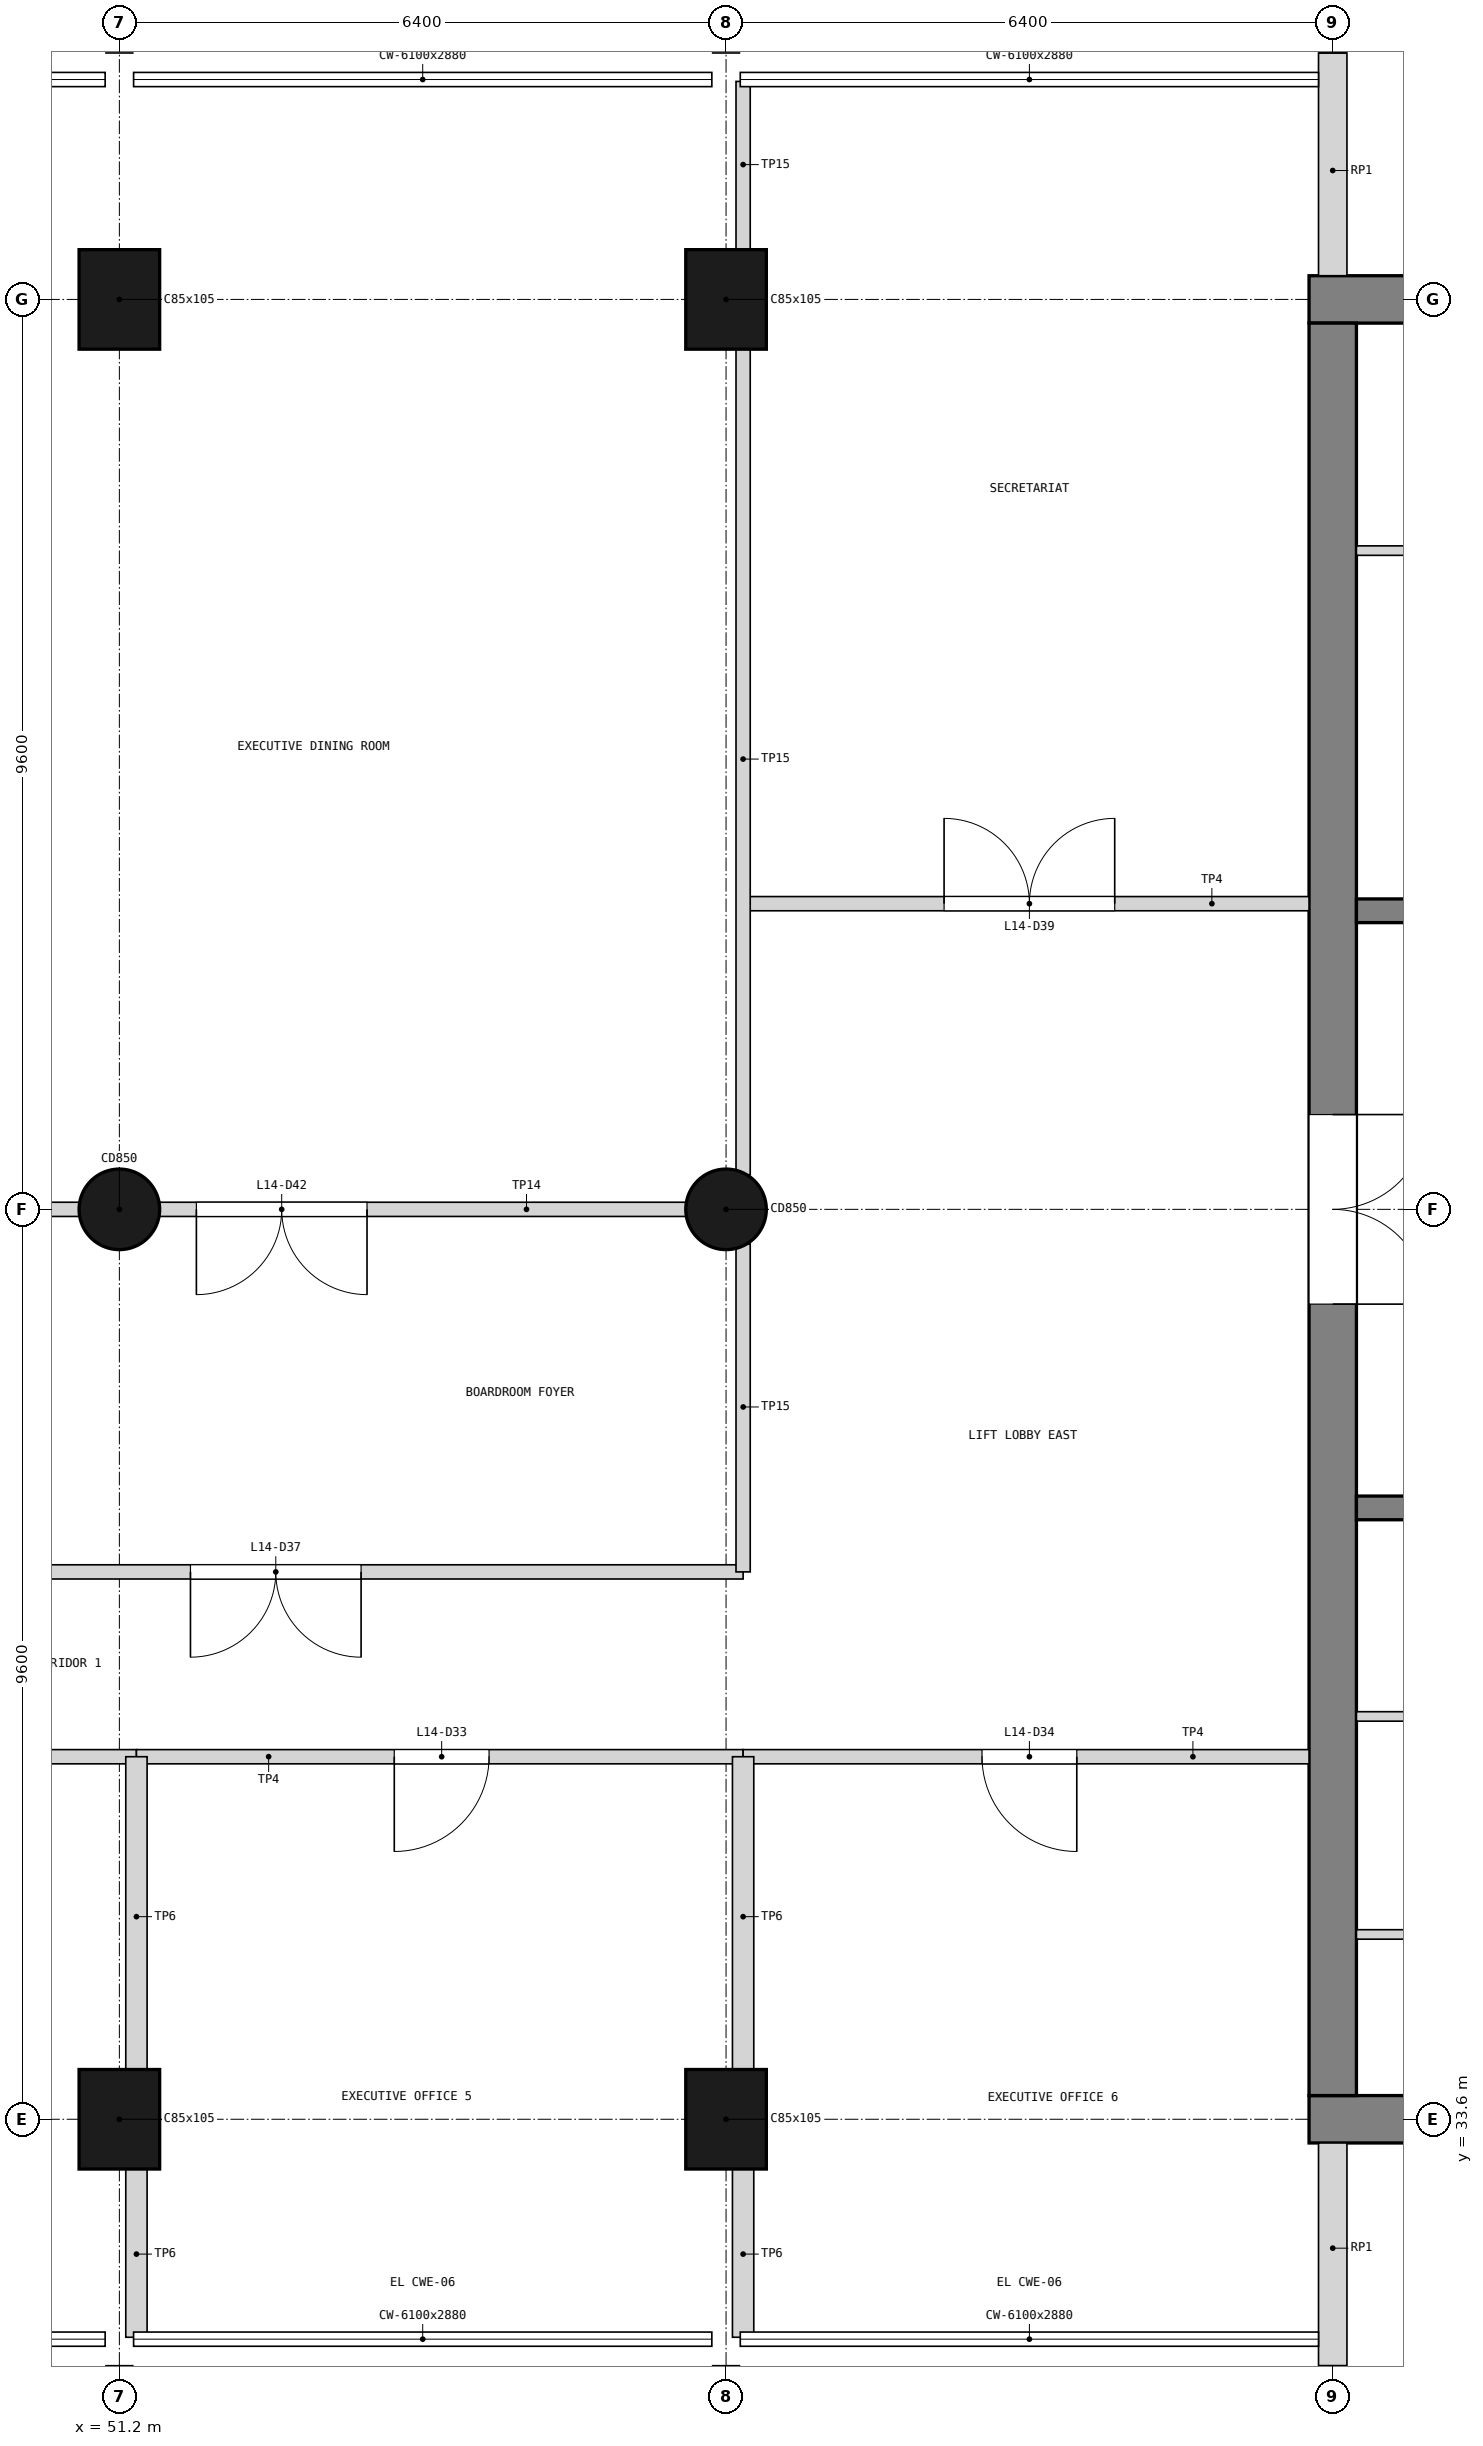
"""IFC4 building model, lengths in metres.
Left out: names, types, materials, properties, quantities, classifications, styles, units other than length and angle.
Written with IfcOpenShell. Run it as: python <this file> out.ifc"""

import sys

from ifc_helpers import new_model, si_unit, direction, frame, frame_2d, origin, origin_2d, place, context, subcontext, project, spatial, rectangle, circle, extrude, element, fill, save


model = new_model("IFC4")
c1 = context("Model", 3, precision=1e-05, world=origin(), true_north=direction((0.0, 1.0)))
c2 = subcontext(c1, "Body", "Model", "MODEL_VIEW")
j1 = project(units=[si_unit("LENGTHUNIT", "METRE"), si_unit("PLANEANGLEUNIT", "RADIAN")], contexts=[c1])
p1 = place(None, origin())
s1 = spatial("IfcSite", under=j1, at=p1, CompositionType="ELEMENT")
p2 = place(p1, origin())
s2 = spatial("IfcBuilding", under=s1, at=p2, CompositionType="ELEMENT")
p3 = place(p2, frame((0.0, 0.0, 56.1)))
s3 = spatial("IfcBuildingStorey", under=s2, at=p3, CompositionType="ELEMENT", Elevation=56.1)
p4 = place(p3, frame((63.75, 52.8, 0.0), z_axis=(0.0, 0.0, 1.0), x_axis=(1.0, 0.0, 0.0)))
e1 = element("IfcWall", 1, at=p4, inside=s3, PredefinedType="SHEAR", context=c2, shape_type="SweptSolid", body=[
    extrude(rectangle(XDim=13.3, YDim=0.5, at=frame_2d((6.65, 0.0))), origin(), (0.0, 0.0, 1.0), 3.9),
])
p5 = place(p4, frame((11.05, 0.0, 1.0)))
e2 = element("IfcOpeningElement", 2, at=p5, cuts=e1, PredefinedType="OPENING", context=c2, shape_type="SweptSolid", body=[
    extrude(rectangle(XDim=0.4, YDim=2.0, at=frame_2d((0.2, 1.0))), frame((0.0, 0.26, 0.0), z_axis=(0.0, -1.0, 0.0), x_axis=(1.0, 0.0, 0.0)), (0.0, 0.0, 1.0), 0.52),
])
p6 = place(p3, frame((63.75, 33.6, 0.0), z_axis=(0.0, 0.0, 1.0), x_axis=(1.0, 0.0, 0.0)))
e3 = element("IfcWall", 3, at=p6, inside=s3, PredefinedType="SHEAR", context=c2, shape_type="SweptSolid", body=[
    extrude(rectangle(XDim=13.3, YDim=0.5, at=frame_2d((6.65, 0.0))), origin(), (0.0, 0.0, 1.0), 3.9),
])
p7 = place(p6, frame((11.05, 0.0, 1.0)))
e4 = element("IfcOpeningElement", 4, at=p7, cuts=e3, PredefinedType="OPENING", context=c2, shape_type="SweptSolid", body=[
    extrude(rectangle(XDim=0.4, YDim=2.0, at=frame_2d((0.2, 1.0))), frame((0.0, 0.26, 0.0), z_axis=(0.0, -1.0, 0.0), x_axis=(1.0, 0.0, 0.0)), (0.0, 0.0, 1.0), 0.52),
])
p8 = place(p3, frame((64.0, 33.85, 0.0), z_axis=(0.0, 0.0, 1.0), x_axis=(0.0, 1.0, 0.0)))
e5 = element("IfcWall", 5, at=p8, inside=s3, PredefinedType="SHEAR", context=c2, shape_type="SweptSolid", body=[
    extrude(rectangle(XDim=18.7, YDim=0.5, at=frame_2d((9.35, 0.0))), origin(), (0.0, 0.0, 1.0), 3.9),
])
p9 = place(p8, frame((8.35, 0.0, 0.0)))
e6 = element("IfcOpeningElement", 6, at=p9, cuts=e5, PredefinedType="OPENING", context=c2, shape_type="SweptSolid", body=[
    extrude(rectangle(XDim=2.0, YDim=2.1, at=frame_2d((1.0, 1.05))), frame((0.0, 0.26, 0.0), z_axis=(0.0, -1.0, 0.0), x_axis=(1.0, 0.0, 0.0)), (0.0, 0.0, 1.0), 0.52),
])
p10 = place(p3, frame((51.2, 33.6, 0.0), z_axis=(0.0, 0.0, 1.0), x_axis=(1.0, 0.0, 0.0)))
e7 = element("IfcColumn", 7, at=p10, inside=s3, PredefinedType="COLUMN", context=c2, shape_type="SweptSolid", body=[
    extrude(rectangle(XDim=0.85, YDim=1.05, at=origin_2d()), origin(), (0.0, 0.0, 1.0), 3.9),
])
p11 = place(p3, frame((51.2, 43.2, 0.0), z_axis=(0.0, 0.0, 1.0), x_axis=(1.0, 0.0, 0.0)))
e8 = element("IfcColumn", 8, at=p11, inside=s3, PredefinedType="COLUMN", context=c2, shape_type="SweptSolid", body=[
    extrude(circle(Radius=0.425, at=origin_2d()), origin(), (0.0, 0.0, 1.0), 3.9),
])
for number, where, z_axis, x_axis in (
    (9, (51.2, 52.8, 0.0), (0.0, 0.0, 1.0), (1.0, 0.0, 0.0)),
    (10, (57.6, 33.6, 0.0), (0.0, 0.0, 1.0), (1.0, 0.0, 0.0)),
):
    element("IfcColumn", number, at=place(p3, frame(where, z_axis=z_axis, x_axis=x_axis)), inside=s3, PredefinedType="COLUMN", context=c2, shape_type="SweptSolid", body=[
        extrude(rectangle(XDim=0.85, YDim=1.05, at=origin_2d()), origin(), (0.0, 0.0, 1.0), 3.9),
    ])
p12 = place(p3, frame((57.6, 43.2, 0.0), z_axis=(0.0, 0.0, 1.0), x_axis=(1.0, 0.0, 0.0)))
e11 = element("IfcColumn", 11, at=p12, inside=s3, PredefinedType="COLUMN", context=c2, shape_type="SweptSolid", body=[
    extrude(circle(Radius=0.425, at=origin_2d()), origin(), (0.0, 0.0, 1.0), 3.9),
])
p13 = place(p3, frame((57.6, 52.8, 0.0), z_axis=(0.0, 0.0, 1.0), x_axis=(1.0, 0.0, 0.0)))
e12 = element("IfcColumn", 12, at=p13, inside=s3, PredefinedType="COLUMN", context=c2, shape_type="SweptSolid", body=[
    extrude(rectangle(XDim=0.85, YDim=1.05, at=origin_2d()), origin(), (0.0, 0.0, 1.0), 3.9),
])
p14 = place(p3, frame((64.0, 31.0, 0.0), z_axis=(0.0, 0.0, 1.0), x_axis=(0.0, 1.0, 0.0)))
e13 = element("IfcWall", 13, at=p14, inside=s3, PredefinedType="SOLIDWALL", context=c2, shape_type="SweptSolid", body=[
    extrude(rectangle(XDim=2.35, YDim=0.3, at=frame_2d((1.175, 0.0))), origin(), (0.0, 0.0, 1.0), 2.88),
])
p15 = place(p3, frame((64.0, 53.05, 0.0), z_axis=(0.0, 0.0, 1.0), x_axis=(0.0, 1.0, 0.0)))
e14 = element("IfcWall", 14, at=p15, inside=s3, PredefinedType="SOLIDWALL", context=c2, shape_type="SweptSolid", body=[
    extrude(rectangle(XDim=2.35, YDim=0.3, at=frame_2d((1.175, 0.0))), origin(), (0.0, 0.0, 1.0), 2.88),
])
for number, where, z_axis, x_axis in (
    (15, (69.725, 40.05, 0.0), (0.0, 0.0, 1.0), (-1.0, 0.0, 0.0)),
    (16, (69.725, 46.35, 0.0), (0.0, 0.0, 1.0), (-1.0, 0.0, 0.0)),
):
    element("IfcWall", number, at=place(p3, frame(where, z_axis=z_axis, x_axis=x_axis)), inside=s3, PredefinedType="SOLIDWALL", context=c2, shape_type="SweptSolid", body=[
        extrude(rectangle(XDim=5.475, YDim=0.25, at=frame_2d((2.738, 0.0))), origin(), (0.0, 0.0, 1.0), 3.6),
    ])
p16 = place(p3, frame((69.475, 35.55, 0.0), z_axis=(0.0, 0.0, 1.0), x_axis=(-1.0, 0.0, 0.0)))
e17 = element("IfcWall", 17, at=p16, inside=s3, PredefinedType="PARTITIONING", context=c2, shape_type="SweptSolid", body=[
    extrude(rectangle(XDim=5.225, YDim=0.1, at=frame_2d((2.613, 0.0))), origin(), (0.0, 0.0, 1.0), 3.6),
])
p17 = place(p3, frame((67.925, 37.85, 0.0), z_axis=(0.0, 0.0, 1.0), x_axis=(-1.0, 0.0, 0.0)))
e18 = element("IfcWall", 18, at=p17, inside=s3, PredefinedType="PARTITIONING", context=c2, shape_type="SweptSolid", body=[
    extrude(rectangle(XDim=3.675, YDim=0.1, at=frame_2d((1.837, 0.0))), origin(), (0.0, 0.0, 1.0), 3.6),
])
p18 = place(p3, frame((69.475, 50.15, 0.0), z_axis=(0.0, 0.0, 1.0), x_axis=(-1.0, 0.0, 0.0)))
e19 = element("IfcWall", 19, at=p18, inside=s3, PredefinedType="PARTITIONING", context=c2, shape_type="SweptSolid", body=[
    extrude(rectangle(XDim=5.225, YDim=0.1, at=frame_2d((2.613, 0.0))), origin(), (0.0, 0.0, 1.0), 3.6),
])
p19 = place(p3, frame((44.62, 37.425, 0.0), z_axis=(0.0, 0.0, 1.0), x_axis=(1.0, 0.0, 0.0)))
e20 = element("IfcWall", 20, at=p19, inside=s3, PredefinedType="PARTITIONING", context=c2, shape_type="SweptSolid", body=[
    extrude(rectangle(XDim=6.76, YDim=0.15, at=frame_2d((3.38, 0.0))), origin(), (0.0, 0.0, 1.0), 3.68),
])
p20 = place(p19, frame((2.88, 0.0, 0.0)))
e21 = element("IfcOpeningElement", 21, at=p20, cuts=e20, PredefinedType="OPENING", context=c2, shape_type="SweptSolid", body=[
    extrude(rectangle(XDim=1.0, YDim=2.1, at=frame_2d((0.5, 1.05))), frame((0.0, 0.085, 0.0), z_axis=(0.0, -1.0, 0.0), x_axis=(1.0, 0.0, 0.0)), (0.0, 0.0, 1.0), 0.17),
])
p21 = place(p3, frame((51.38, 37.425, 0.0), z_axis=(0.0, 0.0, 1.0), x_axis=(1.0, 0.0, 0.0)))
e22 = element("IfcWall", 22, at=p21, inside=s3, PredefinedType="PARTITIONING", context=c2, shape_type="SweptSolid", body=[
    extrude(rectangle(XDim=6.4, YDim=0.15, at=frame_2d((3.2, 0.0))), origin(), (0.0, 0.0, 1.0), 3.68),
])
p22 = place(p21, frame((2.72, 0.0, 0.0)))
e23 = element("IfcOpeningElement", 23, at=p22, cuts=e22, PredefinedType="OPENING", context=c2, shape_type="SweptSolid", body=[
    extrude(rectangle(XDim=1.0, YDim=2.1, at=frame_2d((0.5, 1.05))), frame((0.0, 0.085, 0.0), z_axis=(0.0, -1.0, 0.0), x_axis=(1.0, 0.0, 0.0)), (0.0, 0.0, 1.0), 0.17),
])
p23 = place(p3, frame((57.78, 37.425, 0.0), z_axis=(0.0, 0.0, 1.0), x_axis=(1.0, 0.0, 0.0)))
e24 = element("IfcWall", 24, at=p23, inside=s3, PredefinedType="PARTITIONING", context=c2, shape_type="SweptSolid", body=[
    extrude(rectangle(XDim=5.97, YDim=0.15, at=frame_2d((2.985, 0.0))), origin(), (0.0, 0.0, 1.0), 3.68),
])
p24 = place(p23, frame((2.52, 0.0, 0.0)))
e25 = element("IfcOpeningElement", 25, at=p24, cuts=e24, PredefinedType="OPENING", context=c2, shape_type="SweptSolid", body=[
    extrude(rectangle(XDim=1.0, YDim=2.1, at=frame_2d((0.5, 1.05))), frame((0.0, 0.085, 0.0), z_axis=(0.0, -1.0, 0.0), x_axis=(1.0, 0.0, 0.0)), (0.0, 0.0, 1.0), 0.17),
])
p25 = place(p3, frame((51.38, 31.3, 0.0), z_axis=(0.0, 0.0, 1.0), x_axis=(0.0, 1.0, 0.0)))
e26 = element("IfcWall", 26, at=p25, inside=s3, PredefinedType="PARTITIONING", context=c2, shape_type="SweptSolid", body=[
    extrude(rectangle(XDim=1.795, YDim=0.225, at=frame_2d((0.897, 0.0))), origin(), (0.0, 0.0, 1.0), 2.78),
])
p26 = place(p3, frame((51.38, 34.105, 0.0), z_axis=(0.0, 0.0, 1.0), x_axis=(0.0, 1.0, 0.0)))
e27 = element("IfcWall", 27, at=p26, inside=s3, PredefinedType="PARTITIONING", context=c2, shape_type="SweptSolid", body=[
    extrude(rectangle(XDim=3.32, YDim=0.225, at=frame_2d((1.66, 0.0))), origin(), (0.0, 0.0, 1.0), 2.78),
])
p27 = place(p3, frame((57.78, 31.3, 0.0), z_axis=(0.0, 0.0, 1.0), x_axis=(0.0, 1.0, 0.0)))
e28 = element("IfcWall", 28, at=p27, inside=s3, PredefinedType="PARTITIONING", context=c2, shape_type="SweptSolid", body=[
    extrude(rectangle(XDim=1.795, YDim=0.225, at=frame_2d((0.897, 0.0))), origin(), (0.0, 0.0, 1.0), 2.78),
])
p28 = place(p3, frame((57.78, 34.105, 0.0), z_axis=(0.0, 0.0, 1.0), x_axis=(0.0, 1.0, 0.0)))
e29 = element("IfcWall", 29, at=p28, inside=s3, PredefinedType="PARTITIONING", context=c2, shape_type="SweptSolid", body=[
    extrude(rectangle(XDim=3.32, YDim=0.225, at=frame_2d((1.66, 0.0))), origin(), (0.0, 0.0, 1.0), 2.78),
])
p29 = place(p3, frame((38.22, 39.375, 0.0), z_axis=(0.0, 0.0, 1.0), x_axis=(1.0, 0.0, 0.0)))
e30 = element("IfcWall", 30, at=p29, inside=s3, PredefinedType="PARTITIONING", context=c2, shape_type="SweptSolid", body=[
    extrude(rectangle(XDim=19.56, YDim=0.15, at=frame_2d((9.78, 0.0))), origin(), (0.0, 0.0, 1.0), 3.68),
])
p30 = place(p29, frame((4.03, 0.0, 0.0)))
e31 = element("IfcOpeningElement", 31, at=p30, cuts=e30, PredefinedType="OPENING", context=c2, shape_type="SweptSolid", body=[
    extrude(rectangle(XDim=1.8, YDim=2.1, at=frame_2d((0.9, 1.05))), frame((0.0, 0.085, 0.0), z_axis=(0.0, -1.0, 0.0), x_axis=(1.0, 0.0, 0.0)), (0.0, 0.0, 1.0), 0.17),
])
p31 = place(p29, frame((13.73, 0.0, 0.0)))
e32 = element("IfcOpeningElement", 32, at=p31, cuts=e30, PredefinedType="OPENING", context=c2, shape_type="SweptSolid", body=[
    extrude(rectangle(XDim=1.8, YDim=2.1, at=frame_2d((0.9, 1.05))), frame((0.0, 0.085, 0.0), z_axis=(0.0, -1.0, 0.0), x_axis=(1.0, 0.0, 0.0)), (0.0, 0.0, 1.0), 0.17),
])
p32 = place(p3, frame((31.82, 43.2, 0.0), z_axis=(0.0, 0.0, 1.0), x_axis=(1.0, 0.0, 0.0)))
e33 = element("IfcWall", 33, at=p32, inside=s3, PredefinedType="PARTITIONING", context=c2, shape_type="SweptSolid", body=[
    extrude(rectangle(XDim=25.96, YDim=0.15, at=frame_2d((12.98, 0.0))), origin(), (0.0, 0.0, 1.0), 2.88),
])
p33 = place(p32, frame((7.975, 0.0, 0.0)))
e34 = element("IfcOpeningElement", 34, at=p33, cuts=e33, PredefinedType="OPENING", context=c2, shape_type="SweptSolid", body=[
    extrude(rectangle(XDim=1.8, YDim=2.1, at=frame_2d((0.9, 1.05))), frame((0.0, 0.085, 0.0), z_axis=(0.0, -1.0, 0.0), x_axis=(1.0, 0.0, 0.0)), (0.0, 0.0, 1.0), 0.17),
])
p34 = place(p32, frame((13.725, 0.0, 0.0)))
e35 = element("IfcOpeningElement", 35, at=p34, cuts=e33, PredefinedType="OPENING", context=c2, shape_type="SweptSolid", body=[
    extrude(rectangle(XDim=1.8, YDim=2.1, at=frame_2d((0.9, 1.05))), frame((0.0, 0.085, 0.0), z_axis=(0.0, -1.0, 0.0), x_axis=(1.0, 0.0, 0.0)), (0.0, 0.0, 1.0), 0.17),
])
p35 = place(p32, frame((20.192, 0.0, 0.0)))
e36 = element("IfcOpeningElement", 36, at=p35, cuts=e33, PredefinedType="OPENING", context=c2, shape_type="SweptSolid", body=[
    extrude(rectangle(XDim=1.8, YDim=2.1, at=frame_2d((0.9, 1.05))), frame((0.0, 0.085, 0.0), z_axis=(0.0, -1.0, 0.0), x_axis=(1.0, 0.0, 0.0)), (0.0, 0.0, 1.0), 0.17),
])
p36 = place(p3, frame((57.78, 46.425, 0.0), z_axis=(0.0, 0.0, 1.0), x_axis=(1.0, 0.0, 0.0)))
e37 = element("IfcWall", 37, at=p36, inside=s3, PredefinedType="PARTITIONING", context=c2, shape_type="SweptSolid", body=[
    extrude(rectangle(XDim=5.97, YDim=0.15, at=frame_2d((2.985, 0.0))), origin(), (0.0, 0.0, 1.0), 3.68),
])
p37 = place(p36, frame((2.12, 0.0, 0.0)))
e38 = element("IfcOpeningElement", 38, at=p37, cuts=e37, PredefinedType="OPENING", context=c2, shape_type="SweptSolid", body=[
    extrude(rectangle(XDim=1.8, YDim=2.1, at=frame_2d((0.9, 1.05))), frame((0.0, 0.085, 0.0), z_axis=(0.0, -1.0, 0.0), x_axis=(1.0, 0.0, 0.0)), (0.0, 0.0, 1.0), 0.17),
])
p38 = place(p3, frame((57.78, 39.375, 0.0), z_axis=(0.0, 0.0, 1.0), x_axis=(0.0, 1.0, 0.0)))
e39 = element("IfcWall", 39, at=p38, inside=s3, PredefinedType="PARTITIONING", context=c2, shape_type="SweptSolid", body=[
    extrude(rectangle(XDim=3.46, YDim=0.15, at=frame_2d((1.73, 0.0))), origin(), (0.0, 0.0, 1.0), 2.78),
])
p39 = place(p3, frame((57.78, 43.565, 0.0), z_axis=(0.0, 0.0, 1.0), x_axis=(0.0, 1.0, 0.0)))
e40 = element("IfcWall", 40, at=p39, inside=s3, PredefinedType="PARTITIONING", context=c2, shape_type="SweptSolid", body=[
    extrude(rectangle(XDim=8.73, YDim=0.15, at=frame_2d((4.365, 0.0))), origin(), (0.0, 0.0, 1.0), 2.78),
])
p40 = place(p3, frame((57.78, 53.305, 0.0), z_axis=(0.0, 0.0, 1.0), x_axis=(0.0, 1.0, 0.0)))
e41 = element("IfcWall", 41, at=p40, inside=s3, PredefinedType="PARTITIONING", context=c2, shape_type="SweptSolid", body=[
    extrude(rectangle(XDim=1.795, YDim=0.15, at=frame_2d((0.897, 0.0))), origin(), (0.0, 0.0, 1.0), 2.78),
])
p41 = place(p9, frame((2.0, 0.0, 0.0), z_axis=(0.0, 0.0, 1.0), x_axis=(-1.0, 0.0, 0.0)))
e42 = element("IfcDoor", 42, at=p41, inside=s3, OperationType="DOUBLE_DOOR_SINGLE_SWING", PredefinedType="DOOR", context=c2, shape_type="SweptSolid", body=[
    extrude(rectangle(XDim=2.0, YDim=2.1, at=frame_2d((1.0, 1.05))), frame((0.0, 0.025, 0.0), z_axis=(0.0, -1.0, 0.0), x_axis=(1.0, 0.0, 0.0)), (0.0, 0.0, 1.0), 0.05),
])
fill(e6, e42)
p42 = place(p22, frame((1.0, 0.0, 0.0), z_axis=(0.0, 0.0, 1.0), x_axis=(-1.0, 0.0, 0.0)))
e43 = element("IfcDoor", 43, at=p42, inside=s3, OperationType="SINGLE_SWING_RIGHT", PredefinedType="DOOR", context=c2, shape_type="SweptSolid", body=[
    extrude(rectangle(XDim=1.0, YDim=2.1, at=frame_2d((0.5, 1.05))), frame((0.0, 0.025, 0.0), z_axis=(0.0, -1.0, 0.0), x_axis=(1.0, 0.0, 0.0)), (0.0, 0.0, 1.0), 0.05),
])
fill(e23, e43)
p43 = place(p24, frame((1.0, 0.0, 0.0), z_axis=(0.0, 0.0, 1.0), x_axis=(-1.0, 0.0, 0.0)))
e44 = element("IfcDoor", 44, at=p43, inside=s3, OperationType="SINGLE_SWING_LEFT", PredefinedType="DOOR", context=c2, shape_type="SweptSolid", body=[
    extrude(rectangle(XDim=1.0, YDim=2.1, at=frame_2d((0.5, 1.05))), frame((0.0, 0.025, 0.0), z_axis=(0.0, -1.0, 0.0), x_axis=(1.0, 0.0, 0.0)), (0.0, 0.0, 1.0), 0.05),
])
fill(e25, e44)
p44 = place(p31, frame((1.8, 0.0, 0.0), z_axis=(0.0, 0.0, 1.0), x_axis=(-1.0, 0.0, 0.0)))
e45 = element("IfcDoor", 45, at=p44, inside=s3, OperationType="DOUBLE_DOOR_SINGLE_SWING", PredefinedType="DOOR", context=c2, shape_type="SweptSolid", body=[
    extrude(rectangle(XDim=1.8, YDim=2.1, at=frame_2d((0.9, 1.05))), frame((0.0, 0.025, 0.0), z_axis=(0.0, -1.0, 0.0), x_axis=(1.0, 0.0, 0.0)), (0.0, 0.0, 1.0), 0.05),
])
fill(e32, e45)
p45 = place(p37, origin())
e46 = element("IfcDoor", 46, at=p45, inside=s3, OperationType="DOUBLE_DOOR_SINGLE_SWING", PredefinedType="DOOR", context=c2, shape_type="SweptSolid", body=[
    extrude(rectangle(XDim=1.8, YDim=2.1, at=frame_2d((0.9, 1.05))), frame((0.0, 0.025, 0.0), z_axis=(0.0, -1.0, 0.0), x_axis=(1.0, 0.0, 0.0)), (0.0, 0.0, 1.0), 0.05),
])
fill(e38, e46)
p46 = place(p35, frame((1.8, 0.0, 0.0), z_axis=(0.0, 0.0, 1.0), x_axis=(-1.0, 0.0, 0.0)))
e47 = element("IfcDoor", 47, at=p46, inside=s3, OperationType="DOUBLE_DOOR_SINGLE_SWING", PredefinedType="DOOR", context=c2, shape_type="SweptSolid", body=[
    extrude(rectangle(XDim=1.8, YDim=2.1, at=frame_2d((0.9, 1.05))), frame((0.0, 0.025, 0.0), z_axis=(0.0, -1.0, 0.0), x_axis=(1.0, 0.0, 0.0)), (0.0, 0.0, 1.0), 0.05),
])
fill(e36, e47)
save(model, sys.argv[1])
